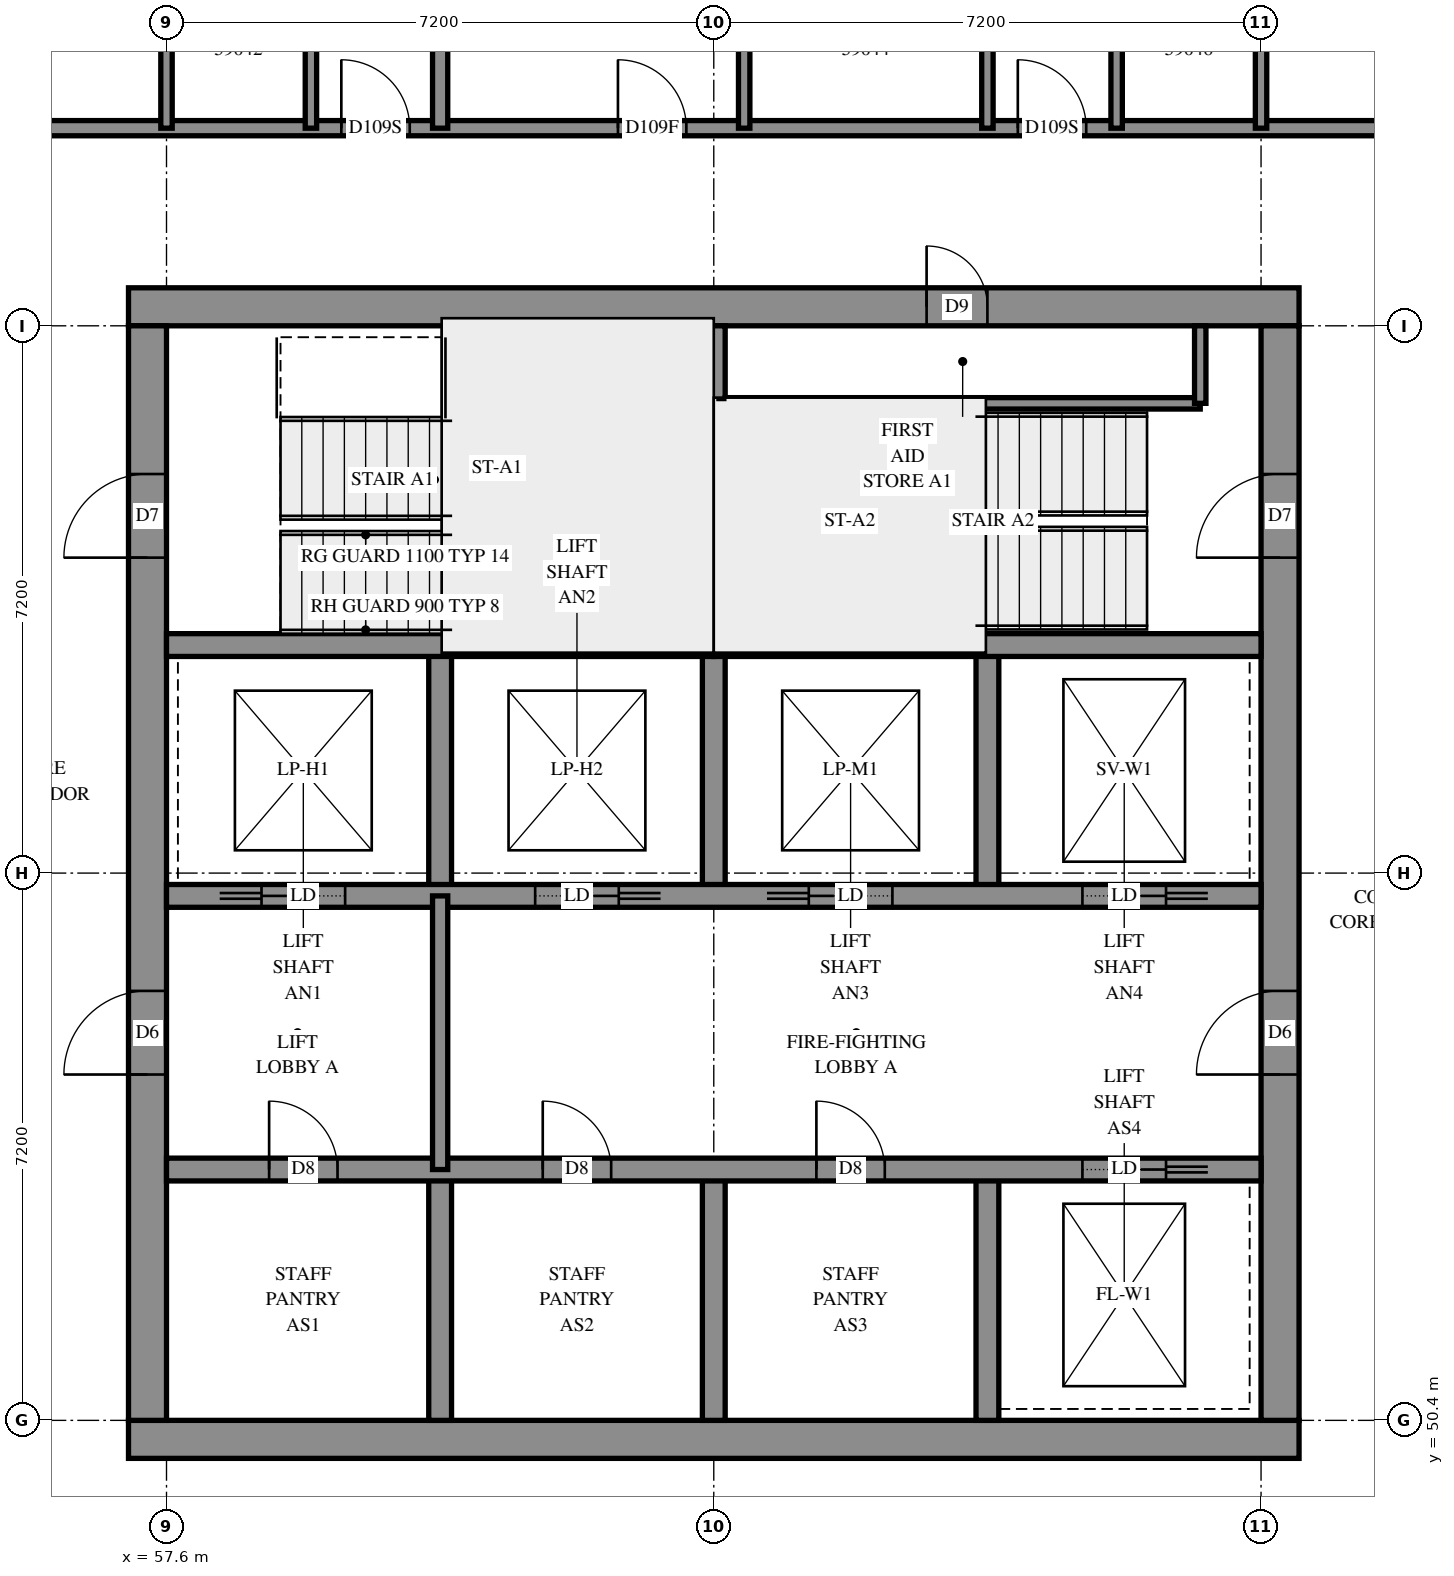
"""IFC4 building model, lengths in metres.
Left out: names, types, materials, properties, quantities, classifications, styles, units other than length and angle.
Written with IfcOpenShell. Run it as: python <this file> out.ifc"""

import sys

from ifc_helpers import new_model, si_unit, direction, frame, frame_2d, origin, place, context, subcontext, project, spatial, rectangle, extrude, element, fill, save


model = new_model("IFC4")
c1 = context("Model", 3, precision=1e-05, world=origin(), true_north=direction((0.0, 1.0)))
c2 = subcontext(c1, "Body", "Model", "MODEL_VIEW")
j1 = project(units=[si_unit("LENGTHUNIT", "METRE"), si_unit("PLANEANGLEUNIT", "RADIAN")], contexts=[c1])
p1 = place(None, origin())
s1 = spatial("IfcSite", under=j1, at=p1, CompositionType="ELEMENT")
p2 = place(p1, origin())
s2 = spatial("IfcBuilding", under=s1, at=p2, CompositionType="ELEMENT")
p3 = place(p2, frame((0.0, 0.0, 216.8)))
s3 = spatial("IfcBuildingStorey", under=s2, at=p3, CompositionType="ELEMENT", Elevation=216.8)
p4 = place(p3, frame((57.1, 50.15, -0.3), z_axis=(0.0, 0.0, 1.0), x_axis=(1.0, 0.0, 0.0)))
e1 = element("IfcWall", 1, at=p4, inside=s3, PredefinedType="SHEAR", context=c2, shape_type="SweptSolid", body=[
    extrude(rectangle(XDim=15.4, YDim=0.5, at=frame_2d((7.7, 0.0))), origin(), (0.0, 0.0, 1.0), 2.7),
])
p5 = place(p3, frame((57.1, 65.05, -0.3), z_axis=(0.0, 0.0, 1.0), x_axis=(1.0, 0.0, 0.0)))
e2 = element("IfcWall", 2, at=p5, inside=s3, PredefinedType="SHEAR", context=c2, shape_type="SweptSolid", body=[
    extrude(rectangle(XDim=15.4, YDim=0.5, at=frame_2d((7.7, 0.0))), origin(), (0.0, 0.0, 1.0), 2.7),
])
p6 = place(p5, frame((10.5, 0.0, 0.3)))
e3 = element("IfcOpeningElement", 3, at=p6, cuts=e2, PredefinedType="OPENING", context=c2, shape_type="SweptSolid", body=[
    extrude(rectangle(XDim=0.8, YDim=2.1, at=frame_2d((0.4, 1.05))), frame((0.0, 0.26, 0.0), z_axis=(0.0, -1.0, 0.0), x_axis=(1.0, 0.0, 0.0)), (0.0, 0.0, 1.0), 0.52),
])
p7 = place(p3, frame((57.35, 50.4, -0.3), z_axis=(0.0, 0.0, 1.0), x_axis=(0.0, 1.0, 0.0)))
e4 = element("IfcWall", 4, at=p7, inside=s3, PredefinedType="SHEAR", context=c2, shape_type="SweptSolid", body=[
    extrude(rectangle(XDim=14.4, YDim=0.5, at=frame_2d((7.2, 0.0))), origin(), (0.0, 0.0, 1.0), 2.7),
])
p8 = place(p7, frame((4.55, 0.0, 0.3)))
e5 = element("IfcOpeningElement", 5, at=p8, cuts=e4, PredefinedType="OPENING", context=c2, shape_type="SweptSolid", body=[
    extrude(rectangle(XDim=1.1, YDim=2.1, at=frame_2d((0.55, 1.05))), frame((0.0, 0.26, 0.0), z_axis=(0.0, -1.0, 0.0), x_axis=(1.0, 0.0, 0.0)), (0.0, 0.0, 1.0), 0.52),
])
p9 = place(p7, frame((11.35, 0.0, 0.3)))
e6 = element("IfcOpeningElement", 6, at=p9, cuts=e4, PredefinedType="OPENING", context=c2, shape_type="SweptSolid", body=[
    extrude(rectangle(XDim=1.1, YDim=2.1, at=frame_2d((0.55, 1.05))), frame((0.0, 0.26, 0.0), z_axis=(0.0, -1.0, 0.0), x_axis=(1.0, 0.0, 0.0)), (0.0, 0.0, 1.0), 0.52),
])
p10 = place(p3, frame((72.25, 50.4, -0.3), z_axis=(0.0, 0.0, 1.0), x_axis=(0.0, 1.0, 0.0)))
e7 = element("IfcWall", 7, at=p10, inside=s3, PredefinedType="SHEAR", context=c2, shape_type="SweptSolid", body=[
    extrude(rectangle(XDim=14.4, YDim=0.5, at=frame_2d((7.2, 0.0))), origin(), (0.0, 0.0, 1.0), 2.7),
])
p11 = place(p10, frame((4.55, 0.0, 0.3)))
e8 = element("IfcOpeningElement", 8, at=p11, cuts=e7, PredefinedType="OPENING", context=c2, shape_type="SweptSolid", body=[
    extrude(rectangle(XDim=1.1, YDim=2.1, at=frame_2d((0.55, 1.05))), frame((0.0, 0.26, 0.0), z_axis=(0.0, -1.0, 0.0), x_axis=(1.0, 0.0, 0.0)), (0.0, 0.0, 1.0), 0.52),
])
p12 = place(p10, frame((11.35, 0.0, 0.3)))
e9 = element("IfcOpeningElement", 9, at=p12, cuts=e7, PredefinedType="OPENING", context=c2, shape_type="SweptSolid", body=[
    extrude(rectangle(XDim=1.1, YDim=2.1, at=frame_2d((0.55, 1.05))), frame((0.0, 0.26, 0.0), z_axis=(0.0, -1.0, 0.0), x_axis=(1.0, 0.0, 0.0)), (0.0, 0.0, 1.0), 0.52),
])
for number, where, z_axis, x_axis in (
    (10, (61.2, 50.4, 0.0), (0.0, 0.0, 1.0), (0.0, 1.0, 0.0)),
    (11, (61.2, 57.3, 0.0), (0.0, 0.0, 1.0), (0.0, 1.0, 0.0)),
    (12, (64.8, 50.4, 0.0), (0.0, 0.0, 1.0), (0.0, 1.0, 0.0)),
    (13, (64.8, 57.3, 0.0), (0.0, 0.0, 1.0), (0.0, 1.0, 0.0)),
    (14, (68.4, 50.4, 0.0), (0.0, 0.0, 1.0), (0.0, 1.0, 0.0)),
    (15, (68.4, 57.3, 0.0), (0.0, 0.0, 1.0), (0.0, 1.0, 0.0)),
):
    element("IfcWall", number, at=place(p3, frame(where, z_axis=z_axis, x_axis=x_axis)), inside=s3, PredefinedType="SOLIDWALL", context=c2, shape_type="SweptSolid", body=[
        extrude(rectangle(XDim=3.3, YDim=0.3, at=frame_2d((1.65, 0.0))), origin(), (0.0, 0.0, 1.0), 3.1),
    ])
p13 = place(p3, frame((57.6, 53.7, 0.0), z_axis=(0.0, 0.0, 1.0), x_axis=(1.0, 0.0, 0.0)))
e16 = element("IfcWall", 16, at=p13, inside=s3, PredefinedType="SOLIDWALL", context=c2, shape_type="SweptSolid", body=[
    extrude(rectangle(XDim=14.4, YDim=0.3, at=frame_2d((7.2, 0.0))), origin(), (0.0, 0.0, 1.0), 3.1),
])
p14 = place(p13, frame((1.35, 0.0, 0.0)))
e17 = element("IfcOpeningElement", 17, at=p14, cuts=e16, PredefinedType="OPENING", context=c2, shape_type="SweptSolid", body=[
    extrude(rectangle(XDim=0.9, YDim=2.1, at=frame_2d((0.45, 1.05))), frame((0.0, 0.16, 0.0), z_axis=(0.0, -1.0, 0.0), x_axis=(1.0, 0.0, 0.0)), (0.0, 0.0, 1.0), 0.32),
])
p15 = place(p13, frame((4.95, 0.0, 0.0)))
e18 = element("IfcOpeningElement", 18, at=p15, cuts=e16, PredefinedType="OPENING", context=c2, shape_type="SweptSolid", body=[
    extrude(rectangle(XDim=0.9, YDim=2.1, at=frame_2d((0.45, 1.05))), frame((0.0, 0.16, 0.0), z_axis=(0.0, -1.0, 0.0), x_axis=(1.0, 0.0, 0.0)), (0.0, 0.0, 1.0), 0.32),
])
p16 = place(p13, frame((8.55, 0.0, 0.0)))
e19 = element("IfcOpeningElement", 19, at=p16, cuts=e16, PredefinedType="OPENING", context=c2, shape_type="SweptSolid", body=[
    extrude(rectangle(XDim=0.9, YDim=2.1, at=frame_2d((0.45, 1.05))), frame((0.0, 0.16, 0.0), z_axis=(0.0, -1.0, 0.0), x_axis=(1.0, 0.0, 0.0)), (0.0, 0.0, 1.0), 0.32),
])
p17 = place(p13, frame((12.05, 0.0, 0.0)))
e20 = element("IfcOpeningElement", 20, at=p17, cuts=e16, PredefinedType="OPENING", context=c2, shape_type="SweptSolid", body=[
    extrude(rectangle(XDim=1.1, YDim=2.1, at=frame_2d((0.55, 1.05))), frame((0.0, 0.16, 0.0), z_axis=(0.0, -1.0, 0.0), x_axis=(1.0, 0.0, 0.0)), (0.0, 0.0, 1.0), 0.32),
])
p18 = place(p3, frame((57.6, 57.3, 0.0), z_axis=(0.0, 0.0, 1.0), x_axis=(1.0, 0.0, 0.0)))
e21 = element("IfcWall", 21, at=p18, inside=s3, PredefinedType="SOLIDWALL", context=c2, shape_type="SweptSolid", body=[
    extrude(rectangle(XDim=14.4, YDim=0.3, at=frame_2d((7.2, 0.0))), origin(), (0.0, 0.0, 1.0), 3.1),
])
p19 = place(p18, frame((1.25, 0.0, 0.0)))
e22 = element("IfcOpeningElement", 22, at=p19, cuts=e21, PredefinedType="OPENING", context=c2, shape_type="SweptSolid", body=[
    extrude(rectangle(XDim=1.1, YDim=2.1, at=frame_2d((0.55, 1.05))), frame((0.0, 0.16, 0.0), z_axis=(0.0, -1.0, 0.0), x_axis=(1.0, 0.0, 0.0)), (0.0, 0.0, 1.0), 0.32),
])
p20 = place(p18, frame((4.85, 0.0, 0.0)))
e23 = element("IfcOpeningElement", 23, at=p20, cuts=e21, PredefinedType="OPENING", context=c2, shape_type="SweptSolid", body=[
    extrude(rectangle(XDim=1.1, YDim=2.1, at=frame_2d((0.55, 1.05))), frame((0.0, 0.16, 0.0), z_axis=(0.0, -1.0, 0.0), x_axis=(1.0, 0.0, 0.0)), (0.0, 0.0, 1.0), 0.32),
])
p21 = place(p18, frame((8.45, 0.0, 0.0)))
e24 = element("IfcOpeningElement", 24, at=p21, cuts=e21, PredefinedType="OPENING", context=c2, shape_type="SweptSolid", body=[
    extrude(rectangle(XDim=1.1, YDim=2.1, at=frame_2d((0.55, 1.05))), frame((0.0, 0.16, 0.0), z_axis=(0.0, -1.0, 0.0), x_axis=(1.0, 0.0, 0.0)), (0.0, 0.0, 1.0), 0.32),
])
p22 = place(p18, frame((12.05, 0.0, 0.0)))
e25 = element("IfcOpeningElement", 25, at=p22, cuts=e21, PredefinedType="OPENING", context=c2, shape_type="SweptSolid", body=[
    extrude(rectangle(XDim=1.1, YDim=2.1, at=frame_2d((0.55, 1.05))), frame((0.0, 0.16, 0.0), z_axis=(0.0, -1.0, 0.0), x_axis=(1.0, 0.0, 0.0)), (0.0, 0.0, 1.0), 0.32),
])
for number, where, z_axis, x_axis in (
    (26, (57.6, 60.6, 0.0), (0.0, 0.0, 1.0), (1.0, 0.0, 0.0)),
    (27, (64.8, 60.6, 0.0), (0.0, 0.0, 1.0), (1.0, 0.0, 0.0)),
):
    element("IfcWall", number, at=place(p3, frame(where, z_axis=z_axis, x_axis=x_axis)), inside=s3, PredefinedType="SOLIDWALL", context=c2, shape_type="SweptSolid", body=[
        extrude(rectangle(XDim=7.2, YDim=0.3, at=frame_2d((3.6, 0.0))), origin(), (0.0, 0.0, 1.0), 3.1),
    ])
p23 = place(p3, frame((64.8, 60.6, 0.0), z_axis=(0.0, 0.0, 1.0), x_axis=(0.0, 1.0, 0.0)))
e28 = element("IfcWall", 28, at=p23, inside=s3, PredefinedType="SOLIDWALL", context=c2, shape_type="SweptSolid", body=[
    extrude(rectangle(XDim=4.2, YDim=0.3, at=frame_2d((2.1, 0.0))), origin(), (0.0, 0.0, 1.0), 3.1),
])
p24 = place(p3, frame((64.95, 63.78, 0.0), z_axis=(0.0, 0.0, 1.0), x_axis=(1.0, 0.0, 0.0)))
e29 = element("IfcWall", 29, at=p24, inside=s3, PredefinedType="PARTITIONING", context=c2, shape_type="SweptSolid", body=[
    extrude(rectangle(XDim=6.25, YDim=0.15, at=frame_2d((3.125, 0.0))), origin(), (0.0, 0.0, 1.0), 3.1),
])
p25 = place(p3, frame((71.2, 63.78, 0.0), z_axis=(0.0, 0.0, 1.0), x_axis=(0.0, 1.0, 0.0)))
e30 = element("IfcWall", 30, at=p25, inside=s3, PredefinedType="PARTITIONING", context=c2, shape_type="SweptSolid", body=[
    extrude(rectangle(XDim=1.02, YDim=0.15, at=frame_2d((0.51, 0.0))), origin(), (0.0, 0.0, 1.0), 3.1),
])
p26 = place(p3, frame((61.2, 53.7, 0.0), z_axis=(0.0, 0.0, 1.0), x_axis=(0.0, 1.0, 0.0)))
e31 = element("IfcWall", 31, at=p26, inside=s3, PredefinedType="PARTITIONING", context=c2, shape_type="SweptSolid", body=[
    extrude(rectangle(XDim=3.6, YDim=0.2, at=frame_2d((1.8, 0.0))), origin(), (0.0, 0.0, 1.0), 3.1),
])
p27 = place(p3, frame((55.0, 67.4, 0.0), z_axis=(0.0, 0.0, 1.0), x_axis=(1.0, 0.0, 0.0)))
e32 = element("IfcWall", 32, at=p27, inside=s3, PredefinedType="PARTITIONING", context=c2, shape_type="SweptSolid", body=[
    extrude(rectangle(XDim=19.6, YDim=0.2, at=frame_2d((9.8, 0.0))), origin(), (0.0, 0.0, 1.0), 3.1),
])
p28 = place(p27, frame((4.9, 0.0, 0.0)))
e33 = element("IfcOpeningElement", 33, at=p28, cuts=e32, PredefinedType="OPENING", context=c2, shape_type="SweptSolid", body=[
    extrude(rectangle(XDim=0.9, YDim=2.1, at=frame_2d((0.45, 1.05))), frame((0.0, 0.11, 0.0), z_axis=(0.0, -1.0, 0.0), x_axis=(1.0, 0.0, 0.0)), (0.0, 0.0, 1.0), 0.22),
])
p29 = place(p27, frame((8.539, 0.0, 0.0)))
e34 = element("IfcOpeningElement", 34, at=p29, cuts=e32, PredefinedType="OPENING", context=c2, shape_type="SweptSolid", body=[
    extrude(rectangle(XDim=0.9, YDim=2.1, at=frame_2d((0.45, 1.05))), frame((0.0, 0.11, 0.0), z_axis=(0.0, -1.0, 0.0), x_axis=(1.0, 0.0, 0.0)), (0.0, 0.0, 1.0), 0.22),
])
p30 = place(p27, frame((13.8, 0.0, 0.0)))
e35 = element("IfcOpeningElement", 35, at=p30, cuts=e32, PredefinedType="OPENING", context=c2, shape_type="SweptSolid", body=[
    extrude(rectangle(XDim=0.9, YDim=2.1, at=frame_2d((0.45, 1.05))), frame((0.0, 0.11, 0.0), z_axis=(0.0, -1.0, 0.0), x_axis=(1.0, 0.0, 0.0)), (0.0, 0.0, 1.0), 0.22),
])
p31 = place(p3, frame((61.2, 67.4, 0.0), z_axis=(0.0, 0.0, 1.0), x_axis=(0.0, 1.0, 0.0)))
e36 = element("IfcWall", 36, at=p31, inside=s3, PredefinedType="PARTITIONING", context=c2, shape_type="SweptSolid", body=[
    extrude(rectangle(XDim=5.325, YDim=0.2, at=frame_2d((2.663, 0.0))), origin(), (0.0, 0.0, 1.0), 3.1),
])
for number, where, z_axis, x_axis in (
    (37, (59.5, 67.4, 0.0), (0.0, 0.0, 1.0), (0.0, 1.0, 0.0)),
    (38, (57.6, 67.4, 0.0), (0.0, 0.0, 1.0), (0.0, 1.0, 0.0)),
    (39, (65.2, 67.4, 0.0), (0.0, 0.0, 1.0), (0.0, 1.0, 0.0)),
    (40, (68.4, 67.4, 0.0), (0.0, 0.0, 1.0), (0.0, 1.0, 0.0)),
    (41, (70.1, 67.4, 0.0), (0.0, 0.0, 1.0), (0.0, 1.0, 0.0)),
    (42, (72.0, 67.4, 0.0), (0.0, 0.0, 1.0), (0.0, 1.0, 0.0)),
):
    element("IfcWall", number, at=place(p3, frame(where, z_axis=z_axis, x_axis=x_axis)), inside=s3, PredefinedType="PARTITIONING", context=c2, shape_type="SweptSolid", body=[
        extrude(rectangle(XDim=2.4, YDim=0.15, at=frame_2d((1.2, 0.0))), origin(), (0.0, 0.0, 1.0), 3.1),
    ])
p32 = place(p6, origin())
e43 = element("IfcDoor", 43, at=p32, inside=s3, OperationType="SINGLE_SWING_RIGHT", PredefinedType="DOOR", context=c2, shape_type="SweptSolid", body=[
    extrude(rectangle(XDim=0.8, YDim=2.1, at=frame_2d((0.4, 1.05))), frame((0.0, 0.025, 0.0), z_axis=(0.0, -1.0, 0.0), x_axis=(1.0, 0.0, 0.0)), (0.0, 0.0, 1.0), 0.05),
])
fill(e3, e43)
p33 = place(p8, origin())
e44 = element("IfcDoor", 44, at=p33, inside=s3, OperationType="DOUBLE_DOOR_SINGLE_SWING", PredefinedType="DOOR", context=c2, shape_type="SweptSolid", body=[
    extrude(rectangle(XDim=1.1, YDim=2.1, at=frame_2d((0.55, 1.05))), frame((0.0, 0.025, 0.0), z_axis=(0.0, -1.0, 0.0), x_axis=(1.0, 0.0, 0.0)), (0.0, 0.0, 1.0), 0.05),
])
fill(e5, e44)
p34 = place(p11, origin())
e45 = element("IfcDoor", 45, at=p34, inside=s3, OperationType="DOUBLE_DOOR_SINGLE_SWING", PredefinedType="DOOR", context=c2, shape_type="SweptSolid", body=[
    extrude(rectangle(XDim=1.1, YDim=2.1, at=frame_2d((0.55, 1.05))), frame((0.0, 0.025, 0.0), z_axis=(0.0, -1.0, 0.0), x_axis=(1.0, 0.0, 0.0)), (0.0, 0.0, 1.0), 0.05),
])
fill(e8, e45)
p35 = place(p9, origin())
e46 = element("IfcDoor", 46, at=p35, inside=s3, OperationType="SINGLE_SWING_LEFT", PredefinedType="DOOR", context=c2, shape_type="SweptSolid", body=[
    extrude(rectangle(XDim=1.1, YDim=2.1, at=frame_2d((0.55, 1.05))), frame((0.0, 0.025, 0.0), z_axis=(0.0, -1.0, 0.0), x_axis=(1.0, 0.0, 0.0)), (0.0, 0.0, 1.0), 0.05),
])
fill(e6, e46)
p36 = place(p12, origin())
e47 = element("IfcDoor", 47, at=p36, inside=s3, OperationType="SINGLE_SWING_RIGHT", PredefinedType="DOOR", context=c2, shape_type="SweptSolid", body=[
    extrude(rectangle(XDim=1.1, YDim=2.1, at=frame_2d((0.55, 1.05))), frame((0.0, 0.025, 0.0), z_axis=(0.0, -1.0, 0.0), x_axis=(1.0, 0.0, 0.0)), (0.0, 0.0, 1.0), 0.05),
])
fill(e9, e47)
p37 = place(p14, origin())
e48 = element("IfcDoor", 48, at=p37, inside=s3, OperationType="SINGLE_SWING_LEFT", PredefinedType="DOOR", context=c2, shape_type="SweptSolid", body=[
    extrude(rectangle(XDim=0.9, YDim=2.1, at=frame_2d((0.45, 1.05))), frame((0.0, 0.025, 0.0), z_axis=(0.0, -1.0, 0.0), x_axis=(1.0, 0.0, 0.0)), (0.0, 0.0, 1.0), 0.05),
])
fill(e17, e48)
p38 = place(p15, origin())
e49 = element("IfcDoor", 49, at=p38, inside=s3, OperationType="SINGLE_SWING_LEFT", PredefinedType="DOOR", context=c2, shape_type="SweptSolid", body=[
    extrude(rectangle(XDim=0.9, YDim=2.1, at=frame_2d((0.45, 1.05))), frame((0.0, 0.025, 0.0), z_axis=(0.0, -1.0, 0.0), x_axis=(1.0, 0.0, 0.0)), (0.0, 0.0, 1.0), 0.05),
])
fill(e18, e49)
p39 = place(p16, origin())
e50 = element("IfcDoor", 50, at=p39, inside=s3, OperationType="SINGLE_SWING_LEFT", PredefinedType="DOOR", context=c2, shape_type="SweptSolid", body=[
    extrude(rectangle(XDim=0.9, YDim=2.1, at=frame_2d((0.45, 1.05))), frame((0.0, 0.025, 0.0), z_axis=(0.0, -1.0, 0.0), x_axis=(1.0, 0.0, 0.0)), (0.0, 0.0, 1.0), 0.05),
])
fill(e19, e50)
p40 = place(p17, origin())
e51 = element("IfcDoor", 51, at=p40, inside=s3, OperationType="SLIDING_TO_RIGHT", PredefinedType="DOOR", context=c2, shape_type="SweptSolid", body=[
    extrude(rectangle(XDim=1.1, YDim=2.1, at=frame_2d((0.55, 1.05))), frame((0.0, 0.025, 0.0), z_axis=(0.0, -1.0, 0.0), x_axis=(1.0, 0.0, 0.0)), (0.0, 0.0, 1.0), 0.05),
])
fill(e20, e51)
p41 = place(p19, origin())
e52 = element("IfcDoor", 52, at=p41, inside=s3, OperationType="SLIDING_TO_LEFT", PredefinedType="DOOR", context=c2, shape_type="SweptSolid", body=[
    extrude(rectangle(XDim=1.1, YDim=2.1, at=frame_2d((0.55, 1.05))), frame((0.0, 0.025, 0.0), z_axis=(0.0, -1.0, 0.0), x_axis=(1.0, 0.0, 0.0)), (0.0, 0.0, 1.0), 0.05),
])
fill(e22, e52)
p42 = place(p20, origin())
e53 = element("IfcDoor", 53, at=p42, inside=s3, OperationType="SLIDING_TO_RIGHT", PredefinedType="DOOR", context=c2, shape_type="SweptSolid", body=[
    extrude(rectangle(XDim=1.1, YDim=2.1, at=frame_2d((0.55, 1.05))), frame((0.0, 0.025, 0.0), z_axis=(0.0, -1.0, 0.0), x_axis=(1.0, 0.0, 0.0)), (0.0, 0.0, 1.0), 0.05),
])
fill(e23, e53)
p43 = place(p21, origin())
e54 = element("IfcDoor", 54, at=p43, inside=s3, OperationType="SLIDING_TO_LEFT", PredefinedType="DOOR", context=c2, shape_type="SweptSolid", body=[
    extrude(rectangle(XDim=1.1, YDim=2.1, at=frame_2d((0.55, 1.05))), frame((0.0, 0.025, 0.0), z_axis=(0.0, -1.0, 0.0), x_axis=(1.0, 0.0, 0.0)), (0.0, 0.0, 1.0), 0.05),
])
fill(e24, e54)
p44 = place(p22, origin())
e55 = element("IfcDoor", 55, at=p44, inside=s3, OperationType="SLIDING_TO_RIGHT", PredefinedType="DOOR", context=c2, shape_type="SweptSolid", body=[
    extrude(rectangle(XDim=1.1, YDim=2.1, at=frame_2d((0.55, 1.05))), frame((0.0, 0.025, 0.0), z_axis=(0.0, -1.0, 0.0), x_axis=(1.0, 0.0, 0.0)), (0.0, 0.0, 1.0), 0.05),
])
fill(e25, e55)
p45 = place(p28, origin())
e56 = element("IfcDoor", 56, at=p45, inside=s3, OperationType="SINGLE_SWING_RIGHT", PredefinedType="DOOR", context=c2, shape_type="SweptSolid", body=[
    extrude(rectangle(XDim=0.9, YDim=2.1, at=frame_2d((0.45, 1.05))), frame((0.0, 0.025, 0.0), z_axis=(0.0, -1.0, 0.0), x_axis=(1.0, 0.0, 0.0)), (0.0, 0.0, 1.0), 0.05),
])
fill(e33, e56)
p46 = place(p29, origin())
e57 = element("IfcDoor", 57, at=p46, inside=s3, OperationType="SINGLE_SWING_LEFT", PredefinedType="DOOR", context=c2, shape_type="SweptSolid", body=[
    extrude(rectangle(XDim=0.9, YDim=2.1, at=frame_2d((0.45, 1.05))), frame((0.0, 0.025, 0.0), z_axis=(0.0, -1.0, 0.0), x_axis=(1.0, 0.0, 0.0)), (0.0, 0.0, 1.0), 0.05),
])
fill(e34, e57)
p47 = place(p30, origin())
e58 = element("IfcDoor", 58, at=p47, inside=s3, OperationType="SINGLE_SWING_LEFT", PredefinedType="DOOR", context=c2, shape_type="SweptSolid", body=[
    extrude(rectangle(XDim=0.9, YDim=2.1, at=frame_2d((0.45, 1.05))), frame((0.0, 0.025, 0.0), z_axis=(0.0, -1.0, 0.0), x_axis=(1.0, 0.0, 0.0)), (0.0, 0.0, 1.0), 0.05),
])
fill(e35, e58)
save(model, sys.argv[1])
